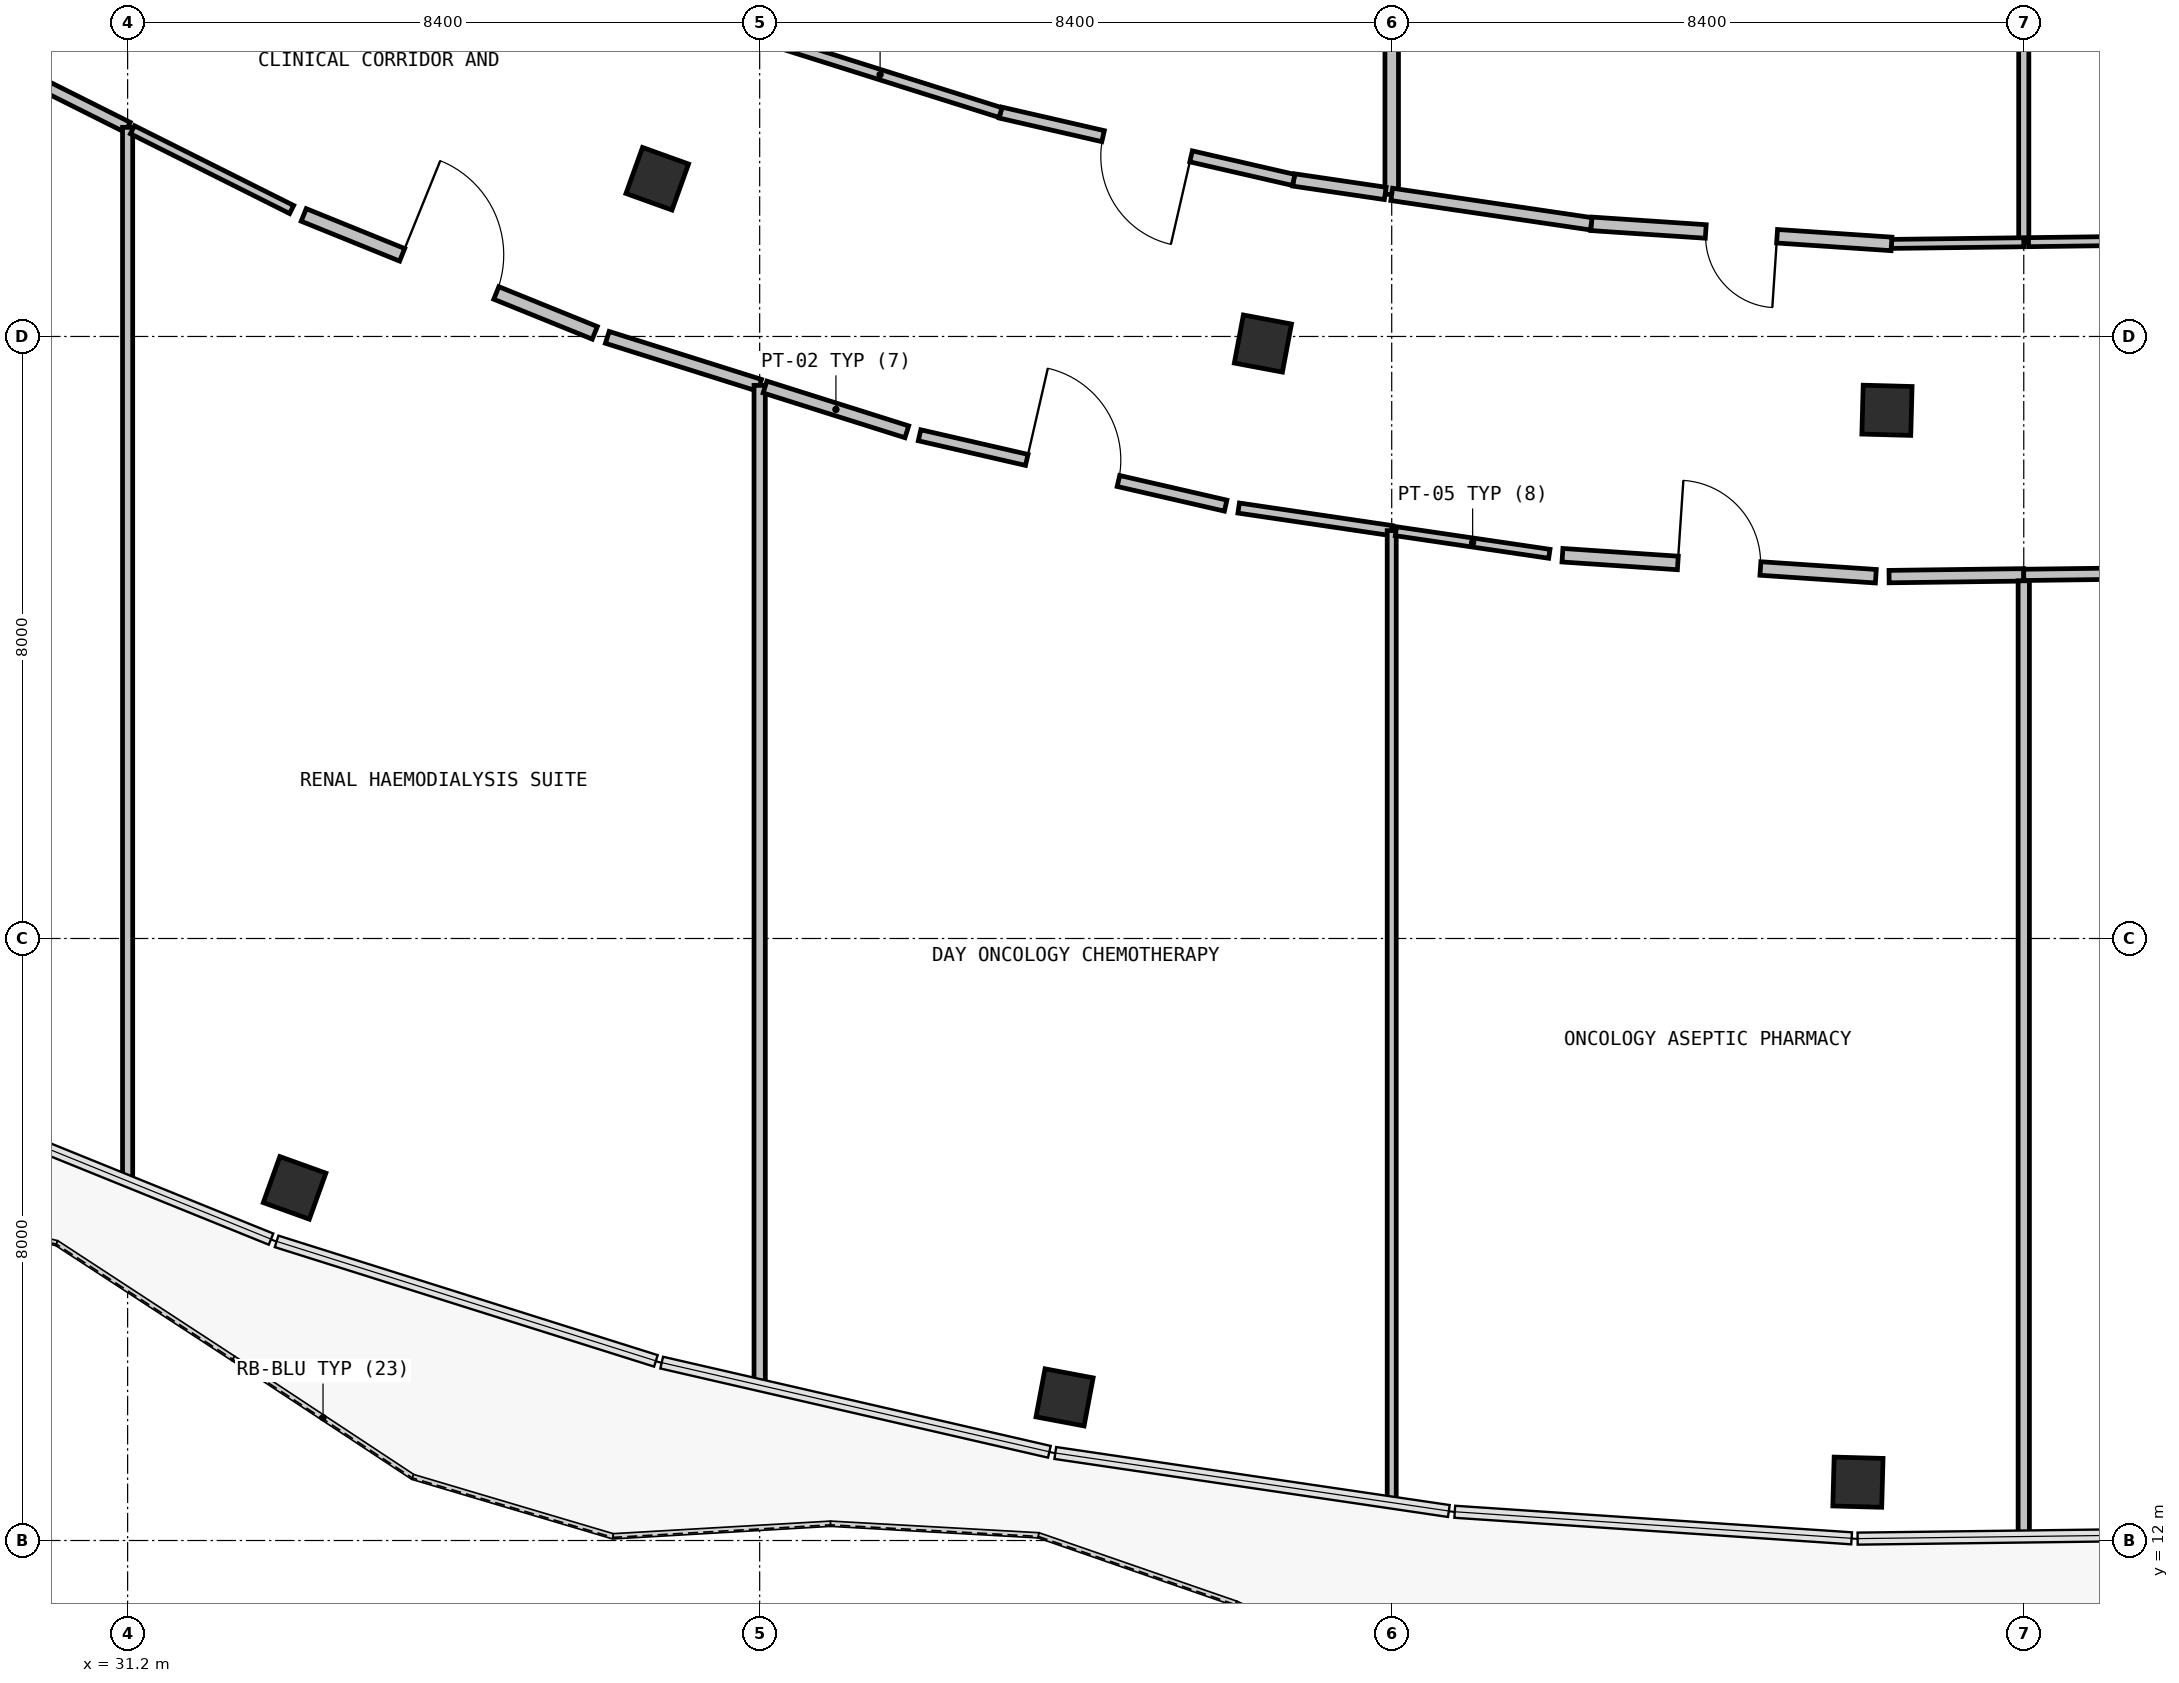
"""IFC4 building model, lengths in metres.
Left out: names, types, materials, properties, quantities, classifications, styles, units other than length and angle.
Written with IfcOpenShell. Run it as: python <this file> out.ifc"""

import sys

from ifc_helpers import new_model, si_unit, direction, frame, frame_2d, origin, origin_2d, place, context, subcontext, project, spatial, rectangle, extrude, element, fill, save


model = new_model("IFC4")
c1 = context("Model", 3, precision=1e-05, world=origin(), true_north=direction((0.0, 1.0)))
c2 = subcontext(c1, "Body", "Model", "MODEL_VIEW")
j1 = project(units=[si_unit("LENGTHUNIT", "METRE"), si_unit("PLANEANGLEUNIT", "RADIAN")], contexts=[c1])
p1 = place(None, origin())
s1 = spatial("IfcSite", under=j1, at=p1, CompositionType="ELEMENT")
p2 = place(p1, origin())
s2 = spatial("IfcBuilding", under=s1, at=p2, CompositionType="ELEMENT")
p3 = place(p2, frame((0.0, 0.0, 15.0)))
s3 = spatial("IfcBuildingStorey", under=s2, at=p3, CompositionType="ELEMENT", Elevation=15.0)
for number, where, z_axis, x_axis in (
    (1, (38.239, 30.096, 0.0), (0.0, 0.0, 1.0), (0.338, 0.941, 0.0)),
    (2, (33.419, 16.686, 0.0), (0.0, 0.0, 1.0), (0.338, 0.941, 0.0)),
    (3, (46.288, 27.906, 0.0), (0.0, 0.0, 1.0), (0.185, 0.983, 0.0)),
    (4, (43.652, 13.902, 0.0), (0.0, 0.0, 1.0), (0.185, 0.983, 0.0)),
    (5, (54.582, 27.019, 0.0), (0.0, 0.0, 1.0), (0.027, 1.0, 0.0)),
    (6, (54.196, 12.775, 0.0), (0.0, 0.0, 1.0), (0.027, 1.0, 0.0)),
):
    element("IfcColumn", number, at=place(p3, frame(where, z_axis=z_axis, x_axis=x_axis)), inside=s3, PredefinedType="COLUMN", context=c2, shape_type="SweptSolid", body=[
        extrude(rectangle(XDim=0.65, YDim=0.65, at=origin_2d()), origin(), (0.0, 0.0, 1.0), 3.91),
    ])
p4 = place(p3, frame((29.648, 31.556, 0.0), z_axis=(0.0, 0.0, 1.0), x_axis=(0.894230168264, -0.447607424165, 0.0)))
e7 = element("IfcWall", 7, at=p4, inside=s3, PredefinedType="PARTITIONING", context=c2, shape_type="SweptSolid", body=[
    extrude(rectangle(XDim=1.736, YDim=0.15, at=frame_2d((0.868, 0.0))), origin(), (0.0, 0.0, 1.0), 3.895),
])
p5 = place(p3, frame((31.2, 30.779, 0.0), z_axis=(0.0, 0.0, 1.0), x_axis=(0.0, -1.0, 0.0)))
e8 = element("IfcWall", 8, at=p5, inside=s3, PredefinedType="PARTITIONING", context=c2, shape_type="SweptSolid", body=[
    extrude(rectangle(XDim=13.99, YDim=0.135, at=frame_2d((6.995, 0.0))), origin(), (0.0, 0.0, 1.0), 3.895),
])
p6 = place(p3, frame((31.264, 30.747, 0.0), z_axis=(0.0, 0.0, 1.0), x_axis=(0.894076176451, -0.447914936905, 0.0)))
e9 = element("IfcWall", 9, at=p6, inside=s3, PredefinedType="PARTITIONING", context=c2, shape_type="SweptSolid", body=[
    extrude(rectangle(XDim=2.367, YDim=0.12, at=frame_2d((1.183, 0.0))), origin(), (0.0, 0.0, 1.0), 3.895),
])
p7 = place(p3, frame((33.54, 29.615, 0.0), z_axis=(0.0, 0.0, 1.0), x_axis=(0.926870756001, -0.375380609075, 0.0)))
e10 = element("IfcWall", 10, at=p7, inside=s3, PredefinedType="PARTITIONING", context=c2, shape_type="SweptSolid", body=[
    extrude(rectangle(XDim=4.174, YDim=0.18, at=frame_2d((2.087, 0.0))), origin(), (0.0, 0.0, 1.0), 3.895),
])
p8 = place(p7, frame((1.412, 0.0, 0.0)))
e11 = element("IfcOpeningElement", 11, at=p8, cuts=e10, PredefinedType="OPENING", context=c2, shape_type="SweptSolid", body=[
    extrude(rectangle(XDim=1.35, YDim=2.15, at=frame_2d((0.675, 1.075))), frame((0.0, 0.1, 0.0), z_axis=(0.0, -1.0, 0.0), x_axis=(1.0, 0.0, 0.0)), (0.0, 0.0, 1.0), 0.2),
])
p9 = place(p3, frame((37.575, 27.988, 0.0), z_axis=(0.0, 0.0, 1.0), x_axis=(0.953796174372, -0.300454418762, 0.0)))
e12 = element("IfcWall", 12, at=p9, inside=s3, PredefinedType="PARTITIONING", context=c2, shape_type="SweptSolid", body=[
    extrude(rectangle(XDim=2.123, YDim=0.165, at=frame_2d((1.062, 0.0))), origin(), (0.0, 0.0, 1.0), 3.895),
])
p10 = place(p3, frame((39.6, 27.35, 0.0), z_axis=(0.0, 0.0, 1.0), x_axis=(0.0, -1.0, 0.0)))
e13 = element("IfcWall", 13, at=p10, inside=s3, PredefinedType="PARTITIONING", context=c2, shape_type="SweptSolid", body=[
    extrude(rectangle(XDim=13.274, YDim=0.15, at=frame_2d((6.637, 0.0))), origin(), (0.0, 0.0, 1.0), 3.895),
])
p11 = place(p3, frame((39.671, 27.328, 0.0), z_axis=(0.0, 0.0, 1.0), x_axis=(0.953625588609, -0.300995409849, 0.0)))
e14 = element("IfcWall", 14, at=p11, inside=s3, PredefinedType="PARTITIONING", context=c2, shape_type="SweptSolid", body=[
    extrude(rectangle(XDim=1.977, YDim=0.165, at=frame_2d((0.988, 0.0))), origin(), (0.0, 0.0, 1.0), 3.895),
])
p12 = place(p3, frame((41.725, 26.687, 0.0), z_axis=(0.0, 0.0, 1.0), x_axis=(0.974584054813, -0.224022141996, 0.0)))
e15 = element("IfcWall", 15, at=p12, inside=s3, PredefinedType="PARTITIONING", context=c2, shape_type="SweptSolid", body=[
    extrude(rectangle(XDim=4.174, YDim=0.15, at=frame_2d((2.087, 0.0))), origin(), (0.0, 0.0, 1.0), 3.895),
])
p13 = place(p12, frame((1.462, 0.0, 0.0)))
e16 = element("IfcOpeningElement", 16, at=p13, cuts=e15, PredefinedType="OPENING", context=c2, shape_type="SweptSolid", body=[
    extrude(rectangle(XDim=1.25, YDim=2.15, at=frame_2d((0.625, 1.075))), frame((0.0, 0.085, 0.0), z_axis=(0.0, -1.0, 0.0), x_axis=(1.0, 0.0, 0.0)), (0.0, 0.0, 1.0), 0.17),
])
p14 = place(p3, frame((45.966, 25.72, 0.0), z_axis=(0.0, 0.0, 1.0), x_axis=(0.989293174374, -0.145941821067, 0.0)))
e17 = element("IfcWall", 17, at=p14, inside=s3, PredefinedType="PARTITIONING", context=c2, shape_type="SweptSolid", body=[
    extrude(rectangle(XDim=2.056, YDim=0.135, at=frame_2d((1.028, 0.0))), origin(), (0.0, 0.0, 1.0), 3.895),
])
p15 = place(p3, frame((48.0, 25.42, 0.0), z_axis=(0.0, 0.0, 1.0), x_axis=(0.0, -1.0, 0.0)))
e18 = element("IfcWall", 18, at=p15, inside=s3, PredefinedType="PARTITIONING", context=c2, shape_type="SweptSolid", body=[
    extrude(rectangle(XDim=12.905, YDim=0.12, at=frame_2d((6.453, 0.0))), origin(), (0.0, 0.0, 1.0), 3.895),
])
p16 = place(p3, frame((48.0, 42.881, 0.0), z_axis=(0.0, 0.0, 1.0), x_axis=(0.0, -1.0, 0.0)))
e19 = element("IfcWall", 19, at=p16, inside=s3, PredefinedType="PARTITIONING", context=c2, shape_type="SweptSolid", body=[
    extrude(rectangle(XDim=12.993, YDim=0.18, at=frame_2d((6.497, 0.0))), origin(), (0.0, 0.0, 1.0), 3.21),
])
p17 = place(p3, frame((47.914, 29.901, 0.0), z_axis=(0.0, 0.0, 1.0), x_axis=(-0.989333072423, 0.145671108357, 0.0)))
e20 = element("IfcWall", 20, at=p17, inside=s3, PredefinedType="PARTITIONING", context=c2, shape_type="SweptSolid", body=[
    extrude(rectangle(XDim=1.23, YDim=0.165, at=frame_2d((0.615, 0.0))), origin(), (0.0, 0.0, 1.0), 3.895),
])
p18 = place(p3, frame((46.697, 30.08, 0.0), z_axis=(0.0, 0.0, 1.0), x_axis=(-0.974613054852, 0.223895943044, 0.0)))
e21 = element("IfcWall", 21, at=p18, inside=s3, PredefinedType="PARTITIONING", context=c2, shape_type="SweptSolid", body=[
    extrude(rectangle(XDim=3.998, YDim=0.15, at=frame_2d((1.999, 0.0))), origin(), (0.0, 0.0, 1.0), 3.895),
])
p19 = place(p18, frame((1.399, 0.0, 0.0)))
e22 = element("IfcOpeningElement", 22, at=p19, cuts=e21, PredefinedType="OPENING", context=c2, shape_type="SweptSolid", body=[
    extrude(rectangle(XDim=1.2, YDim=2.15, at=frame_2d((0.6, 1.075))), frame((0.0, 0.085, 0.0), z_axis=(0.0, -1.0, 0.0), x_axis=(1.0, 0.0, 0.0)), (0.0, 0.0, 1.0), 0.17),
])
p20 = place(p3, frame((42.801, 30.975, 0.0), z_axis=(0.0, 0.0, 1.0), x_axis=(-0.953756214308, 0.300581243042, 0.0)))
e23 = element("IfcWall", 23, at=p20, inside=s3, PredefinedType="PARTITIONING", context=c2, shape_type="SweptSolid", body=[
    extrude(rectangle(XDim=3.356, YDim=0.135, at=frame_2d((1.678, 0.0))), origin(), (0.0, 0.0, 1.0), 3.895),
])
p21 = place(p3, frame((48.056, 25.412, 0.0), z_axis=(0.0, 0.0, 1.0), x_axis=(0.989346092184, -0.145582656525, 0.0)))
e24 = element("IfcWall", 24, at=p21, inside=s3, PredefinedType="PARTITIONING", context=c2, shape_type="SweptSolid", body=[
    extrude(rectangle(XDim=2.061, YDim=0.12, at=frame_2d((1.031, 0.0))), origin(), (0.0, 0.0, 1.0), 3.895),
])
p22 = place(p3, frame((50.269, 25.093, 0.0), z_axis=(0.0, 0.0, 1.0), x_axis=(0.997763106532, -0.066848958427, 0.0)))
e25 = element("IfcWall", 25, at=p22, inside=s3, PredefinedType="PARTITIONING", context=c2, shape_type="SweptSolid", body=[
    extrude(rectangle(XDim=4.174, YDim=0.18, at=frame_2d((2.087, 0.0))), origin(), (0.0, 0.0, 1.0), 3.895),
])
p23 = place(p22, frame((1.537, 0.0, 0.0)))
e26 = element("IfcOpeningElement", 26, at=p23, cuts=e25, PredefinedType="OPENING", context=c2, shape_type="SweptSolid", body=[
    extrude(rectangle(XDim=1.1, YDim=2.15, at=frame_2d((0.55, 1.075))), frame((0.0, 0.1, 0.0), z_axis=(0.0, -1.0, 0.0), x_axis=(1.0, 0.0, 0.0)), (0.0, 0.0, 1.0), 0.2),
])
p24 = place(p3, frame((54.61, 24.809, 0.0), z_axis=(0.0, 0.0, 1.0), x_axis=(0.999917804939, 0.012821207702, 0.0)))
e27 = element("IfcWall", 27, at=p24, inside=s3, PredefinedType="PARTITIONING", context=c2, shape_type="SweptSolid", body=[
    extrude(rectangle(XDim=1.79, YDim=0.165, at=frame_2d((0.895, 0.0))), origin(), (0.0, 0.0, 1.0), 3.895),
])
p25 = place(p3, frame((56.4, 24.753, 0.0), z_axis=(0.0, 0.0, 1.0), x_axis=(0.0, -1.0, 0.0)))
e28 = element("IfcWall", 28, at=p25, inside=s3, PredefinedType="PARTITIONING", context=c2, shape_type="SweptSolid", body=[
    extrude(rectangle(XDim=12.689, YDim=0.15, at=frame_2d((6.344, 0.0))), origin(), (0.0, 0.0, 1.0), 3.895),
])
p26 = place(p3, frame((56.4, 42.02, 0.0), z_axis=(0.0, 0.0, 1.0), x_axis=(0.0, -1.0, 0.0)))
e29 = element("IfcWall", 29, at=p26, inside=s3, PredefinedType="PARTITIONING", context=c2, shape_type="SweptSolid", body=[
    extrude(rectangle(XDim=12.768, YDim=0.135, at=frame_2d((6.384, 0.0))), origin(), (0.0, 0.0, 1.0), 3.895),
])
p27 = place(p3, frame((56.4, 29.252, 0.0), z_axis=(0.0, 0.0, 1.0), x_axis=(-0.999921884154, -0.012499023552, 0.0)))
e30 = element("IfcWall", 30, at=p27, inside=s3, PredefinedType="PARTITIONING", context=c2, shape_type="SweptSolid", body=[
    extrude(rectangle(XDim=1.758, YDim=0.12, at=frame_2d((0.879, 0.0))), origin(), (0.0, 0.0, 1.0), 3.895),
])
p28 = place(p3, frame((54.642, 29.23, 0.0), z_axis=(0.0, 0.0, 1.0), x_axis=(-0.99776702154, 0.06679049878, 0.0)))
e31 = element("IfcWall", 31, at=p28, inside=s3, PredefinedType="PARTITIONING", context=c2, shape_type="SweptSolid", body=[
    extrude(rectangle(XDim=3.999, YDim=0.18, at=frame_2d((2.0, 0.0))), origin(), (0.0, 0.0, 1.0), 3.895),
])
p29 = place(p28, frame((1.524, 0.0, 0.0)))
e32 = element("IfcOpeningElement", 32, at=p29, cuts=e31, PredefinedType="OPENING", context=c2, shape_type="SweptSolid", body=[
    extrude(rectangle(XDim=0.95, YDim=2.1, at=frame_2d((0.475, 1.05))), frame((0.0, 0.1, 0.0), z_axis=(0.0, -1.0, 0.0), x_axis=(1.0, 0.0, 0.0)), (0.0, 0.0, 1.0), 0.2),
])
p30 = place(p3, frame((50.652, 29.497, 0.0), z_axis=(0.0, 0.0, 1.0), x_axis=(-0.989313203243, 0.145805987148, 0.0)))
e33 = element("IfcWall", 33, at=p30, inside=s3, PredefinedType="PARTITIONING", context=c2, shape_type="SweptSolid", body=[
    extrude(rectangle(XDim=2.681, YDim=0.165, at=frame_2d((1.34, 0.0))), origin(), (0.0, 0.0, 1.0), 3.895),
])
p31 = place(p3, frame((56.4, 24.832, 0.0), z_axis=(0.0, 0.0, 1.0), x_axis=(0.999920614738, 0.012600167566, 0.0)))
e34 = element("IfcWall", 34, at=p31, inside=s3, PredefinedType="PARTITIONING", context=c2, shape_type="SweptSolid", body=[
    extrude(rectangle(XDim=2.383, YDim=0.15, at=frame_2d((1.192, 0.0))), origin(), (0.0, 0.0, 1.0), 3.895),
])
p32 = place(p3, frame((58.639, 29.281, 0.0), z_axis=(0.0, 0.0, 1.0), x_axis=(-0.999916773113, -0.012901428128, 0.0)))
e35 = element("IfcWall", 35, at=p32, inside=s3, PredefinedType="PARTITIONING", context=c2, shape_type="SweptSolid", body=[
    extrude(rectangle(XDim=2.176, YDim=0.12, at=frame_2d((1.088, 0.0))), origin(), (0.0, 0.0, 1.0), 3.895),
])
p33 = place(p8, origin())
e36 = element("IfcDoor", 36, at=p33, inside=s3, OperationType="SINGLE_SWING_LEFT", PredefinedType="DOOR", context=c2, shape_type="SweptSolid", body=[
    extrude(rectangle(XDim=1.35, YDim=2.15, at=frame_2d((0.675, 1.075))), frame((0.0, 0.025, 0.0), z_axis=(0.0, -1.0, 0.0), x_axis=(1.0, 0.0, 0.0)), (0.0, 0.0, 1.0), 0.05),
])
fill(e11, e36)
p34 = place(p13, origin())
e37 = element("IfcDoor", 37, at=p34, inside=s3, OperationType="SINGLE_SWING_LEFT", PredefinedType="DOOR", context=c2, shape_type="SweptSolid", body=[
    extrude(rectangle(XDim=1.25, YDim=2.15, at=frame_2d((0.625, 1.075))), frame((0.0, 0.025, 0.0), z_axis=(0.0, -1.0, 0.0), x_axis=(1.0, 0.0, 0.0)), (0.0, 0.0, 1.0), 0.05),
])
fill(e16, e37)
p35 = place(p19, origin())
e38 = element("IfcDoor", 38, at=p35, inside=s3, OperationType="SINGLE_SWING_RIGHT", PredefinedType="DOOR", context=c2, shape_type="SweptSolid", body=[
    extrude(rectangle(XDim=1.2, YDim=2.15, at=frame_2d((0.6, 1.075))), frame((0.0, 0.025, 0.0), z_axis=(0.0, -1.0, 0.0), x_axis=(1.0, 0.0, 0.0)), (0.0, 0.0, 1.0), 0.05),
])
fill(e22, e38)
p36 = place(p23, origin())
e39 = element("IfcDoor", 39, at=p36, inside=s3, OperationType="SINGLE_SWING_LEFT", PredefinedType="DOOR", context=c2, shape_type="SweptSolid", body=[
    extrude(rectangle(XDim=1.1, YDim=2.15, at=frame_2d((0.55, 1.075))), frame((0.0, 0.025, 0.0), z_axis=(0.0, -1.0, 0.0), x_axis=(1.0, 0.0, 0.0)), (0.0, 0.0, 1.0), 0.05),
])
fill(e26, e39)
p37 = place(p29, origin())
e40 = element("IfcDoor", 40, at=p37, inside=s3, OperationType="SINGLE_SWING_RIGHT", PredefinedType="DOOR", context=c2, shape_type="SweptSolid", body=[
    extrude(rectangle(XDim=0.95, YDim=2.1, at=frame_2d((0.475, 1.05))), frame((0.0, 0.025, 0.0), z_axis=(0.0, -1.0, 0.0), x_axis=(1.0, 0.0, 0.0)), (0.0, 0.0, 1.0), 0.05),
])
fill(e32, e40)
save(model, sys.argv[1])
